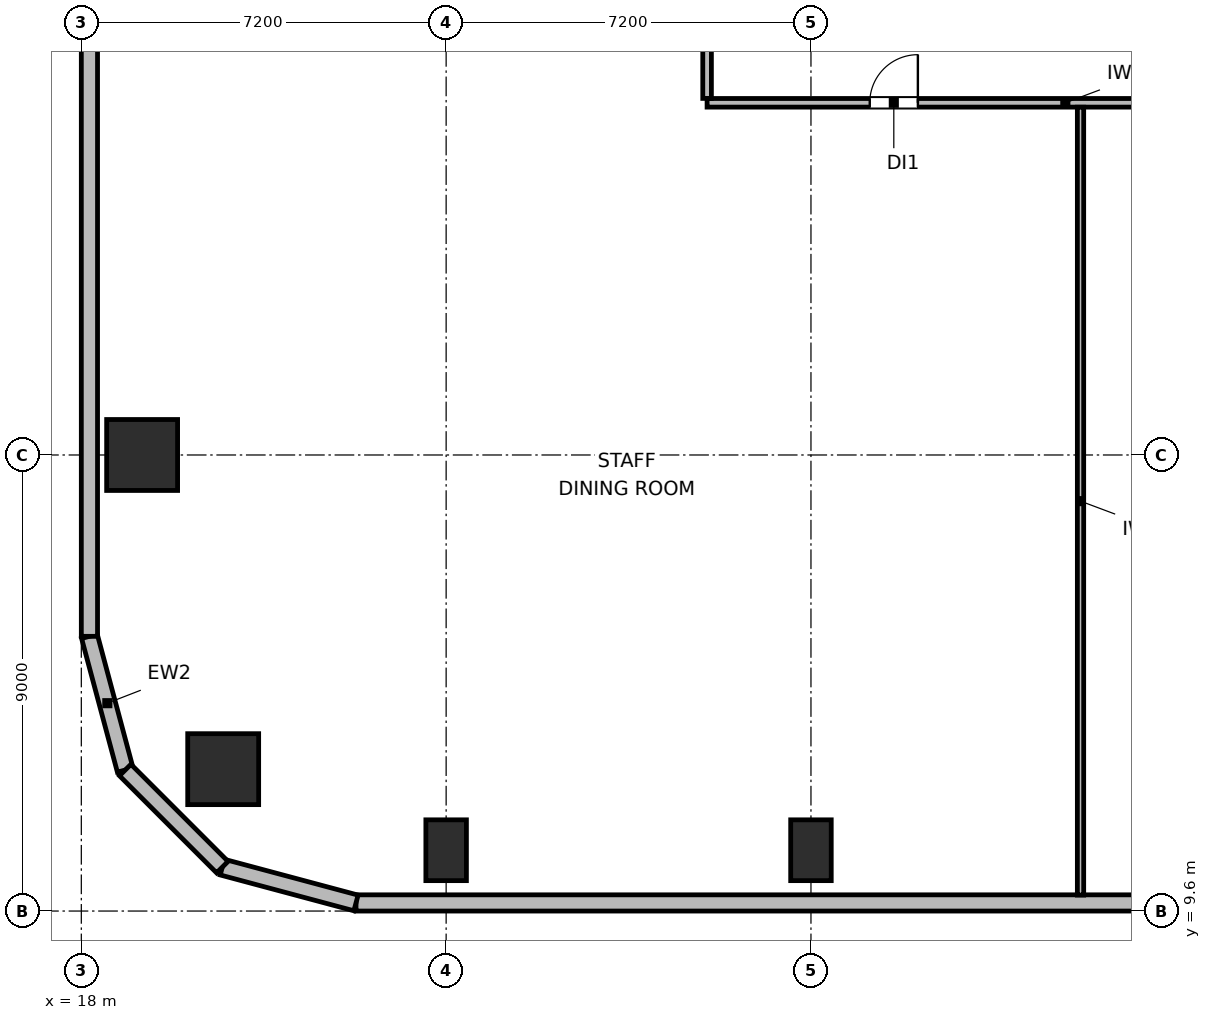
"""IFC4 building model, lengths in metres.
Left out: names, types, materials, properties, quantities, classifications, styles, units other than length and angle.
Written with IfcOpenShell. Run it as: python <this file> out.ifc"""

import sys

from ifc_helpers import new_model, si_unit, direction, frame, frame_2d, origin, origin_2d, place, context, subcontext, project, spatial, rectangle, circle, extrude, element, fill, save


model = new_model("IFC4")
c1 = context("Model", 3, precision=1e-05, world=origin(), true_north=direction((0.0, 1.0)))
c2 = subcontext(c1, "Body", "Model", "MODEL_VIEW")
j1 = project(units=[si_unit("LENGTHUNIT", "METRE"), si_unit("PLANEANGLEUNIT", "RADIAN")], contexts=[c1])
p1 = place(None, origin())
s1 = spatial("IfcSite", under=j1, at=p1, CompositionType="ELEMENT")
p2 = place(p1, origin())
s2 = spatial("IfcBuilding", under=s1, at=p2, CompositionType="ELEMENT")
p3 = place(p2, frame((0.0, 0.0, 141.6)))
s3 = spatial("IfcBuildingStorey", under=s2, at=p3, CompositionType="ELEMENT", Elevation=141.6)
p4 = place(p3, frame((20.8, 12.4, 0.0), z_axis=(0.0, 0.0, 1.0), x_axis=(1.0, 0.0, 0.0)))
e1 = element("IfcColumn", 1, at=p4, inside=s3, PredefinedType="COLUMN", context=c2, shape_type="SweptSolid", body=[
    extrude(circle(Radius=0.7, at=origin_2d()), origin(), (0.0, 0.0, 1.0), 3.9),
])
for number, where, z_axis, x_axis in (
    (2, (25.2, 10.8, 0.0), (0.0, 0.0, 1.0), (1.0, 0.0, 0.0)),
    (3, (32.4, 10.8, 0.0), (0.0, 0.0, 1.0), (1.0, 0.0, 0.0)),
):
    element("IfcColumn", number, at=place(p3, frame(where, z_axis=z_axis, x_axis=x_axis)), inside=s3, PredefinedType="COLUMN", context=c2, shape_type="SweptSolid", body=[
        extrude(rectangle(XDim=0.8, YDim=1.2, at=origin_2d()), origin(), (0.0, 0.0, 1.0), 3.9),
    ])
p5 = place(p3, frame((19.2, 18.6, 0.0), z_axis=(0.0, 0.0, 1.0), x_axis=(1.0, 0.0, 0.0)))
e4 = element("IfcColumn", 4, at=p5, inside=s3, PredefinedType="COLUMN", context=c2, shape_type="SweptSolid", body=[
    extrude(rectangle(XDim=1.4, YDim=1.4, at=origin_2d()), origin(), (0.0, 0.0, 1.0), 3.9),
])
p6 = place(p3, frame((18.866, 12.383, 0.0), z_axis=(0.0, 0.0, 1.0), x_axis=(-0.25869736047, 0.965958423373, 0.0)))
e5 = element("IfcWall", 5, at=p6, inside=s3, PredefinedType="SOLIDWALL", context=c2, shape_type="SweptSolid", body=[
    extrude(rectangle(XDim=2.731, YDim=0.32, at=frame_2d((1.366, 0.0))), origin(), (0.0, 0.0, 1.0), 3.6),
])
p7 = place(p3, frame((18.16, 15.021, 0.0), z_axis=(0.0, 0.0, 1.0), x_axis=(0.0, 1.0, 0.0)))
e6 = element("IfcWall", 6, at=p7, inside=s3, PredefinedType="SOLIDWALL", context=c2, shape_type="SweptSolid", body=[
    extrude(rectangle(XDim=14.219, YDim=0.32, at=frame_2d((7.109, 0.0))), origin(), (0.0, 0.0, 1.0), 3.6),
])
p8 = place(p3, frame((41.355, 9.76, 0.0), z_axis=(0.0, 0.0, 1.0), x_axis=(-1.0, 0.0, 0.0)))
e7 = element("IfcWall", 7, at=p8, inside=s3, PredefinedType="SOLIDWALL", context=c2, shape_type="SweptSolid", body=[
    extrude(rectangle(XDim=17.934, YDim=0.32, at=frame_2d((8.967, 0.0))), origin(), (0.0, 0.0, 1.0), 3.6),
])
p9 = place(p3, frame((23.421, 9.76, 0.0), z_axis=(0.0, 0.0, 1.0), x_axis=(-0.965964405026, 0.25867502435, 0.0)))
e8 = element("IfcWall", 8, at=p9, inside=s3, PredefinedType="SOLIDWALL", context=c2, shape_type="SweptSolid", body=[
    extrude(rectangle(XDim=2.731, YDim=0.32, at=frame_2d((1.366, 0.0))), origin(), (0.0, 0.0, 1.0), 3.6),
])
p10 = place(p3, frame((20.783, 10.467, 0.0), z_axis=(0.0, 0.0, 1.0), x_axis=(-0.707106781187, 0.707106781187, 0.0)))
e9 = element("IfcWall", 9, at=p10, inside=s3, PredefinedType="SOLIDWALL", context=c2, shape_type="SweptSolid", body=[
    extrude(rectangle(XDim=2.71, YDim=0.32, at=frame_2d((1.355, 0.0))), origin(), (0.0, 0.0, 1.0), 3.6),
])
p11 = place(p3, frame((30.35, 25.55, 0.0), z_axis=(0.0, 0.0, 1.0), x_axis=(1.0, 0.0, 0.0)))
e10 = element("IfcWall", 10, at=p11, inside=s3, PredefinedType="PARTITIONING", context=c2, shape_type="SweptSolid", body=[
    extrude(rectangle(XDim=33.25, YDim=0.17, at=frame_2d((16.625, 0.0))), origin(), (0.0, 0.0, 1.0), 3.6),
])
p12 = place(p11, frame((3.21, 0.0, 0.0)))
e11 = element("IfcOpeningElement", 11, at=p12, cuts=e10, PredefinedType="OPENING", context=c2, shape_type="SweptSolid", body=[
    extrude(rectangle(XDim=0.95, YDim=2.04, at=frame_2d((0.475, 1.02))), frame((0.0, 0.095, 0.0), z_axis=(0.0, -1.0, 0.0), x_axis=(1.0, 0.0, 0.0)), (0.0, 0.0, 1.0), 0.19),
])
p13 = place(p11, frame((9.98, 0.0, 0.0)))
e12 = element("IfcOpeningElement", 12, at=p13, cuts=e10, PredefinedType="OPENING", context=c2, shape_type="SweptSolid", body=[
    extrude(rectangle(XDim=0.95, YDim=2.04, at=frame_2d((0.475, 1.02))), frame((0.0, 0.095, 0.0), z_axis=(0.0, -1.0, 0.0), x_axis=(1.0, 0.0, 0.0)), (0.0, 0.0, 1.0), 0.19),
])
p14 = place(p11, frame((16.15, 0.0, 0.0)))
e13 = element("IfcOpeningElement", 13, at=p14, cuts=e10, PredefinedType="OPENING", context=c2, shape_type="SweptSolid", body=[
    extrude(rectangle(XDim=0.95, YDim=2.04, at=frame_2d((0.475, 1.02))), frame((0.0, 0.095, 0.0), z_axis=(0.0, -1.0, 0.0), x_axis=(1.0, 0.0, 0.0)), (0.0, 0.0, 1.0), 0.19),
])
p15 = place(p11, frame((22.32, 0.0, 0.0)))
e14 = element("IfcOpeningElement", 14, at=p15, cuts=e10, PredefinedType="OPENING", context=c2, shape_type="SweptSolid", body=[
    extrude(rectangle(XDim=0.95, YDim=2.04, at=frame_2d((0.475, 1.02))), frame((0.0, 0.095, 0.0), z_axis=(0.0, -1.0, 0.0), x_axis=(1.0, 0.0, 0.0)), (0.0, 0.0, 1.0), 0.19),
])
p16 = place(p11, frame((29.09, 0.0, 0.0)))
e15 = element("IfcOpeningElement", 15, at=p16, cuts=e10, PredefinedType="OPENING", context=c2, shape_type="SweptSolid", body=[
    extrude(rectangle(XDim=0.95, YDim=2.04, at=frame_2d((0.475, 1.02))), frame((0.0, 0.095, 0.0), z_axis=(0.0, -1.0, 0.0), x_axis=(1.0, 0.0, 0.0)), (0.0, 0.0, 1.0), 0.19),
])
p17 = place(p3, frame((30.35, 25.637, 0.0), z_axis=(0.0, 0.0, 1.0), x_axis=(0.0, 1.0, 0.0)))
e16 = element("IfcWall", 16, at=p17, inside=s3, PredefinedType="PARTITIONING", context=c2, shape_type="SweptSolid", body=[
    extrude(rectangle(XDim=8.763, YDim=0.17, at=frame_2d((4.381, 0.0))), origin(), (0.0, 0.0, 1.0), 3.6),
])
p18 = place(p17, frame((3.863, 0.0, 0.0)))
e17 = element("IfcOpeningElement", 17, at=p18, cuts=e16, PredefinedType="OPENING", context=c2, shape_type="SweptSolid", body=[
    extrude(rectangle(XDim=0.95, YDim=2.04, at=frame_2d((0.475, 1.02))), frame((0.0, 0.095, 0.0), z_axis=(0.0, -1.0, 0.0), x_axis=(1.0, 0.0, 0.0)), (0.0, 0.0, 1.0), 0.19),
])
p19 = place(p3, frame((37.72, 9.915, 0.0), z_axis=(0.0, 0.0, 1.0), x_axis=(0.0, 1.0, 0.0)))
e18 = element("IfcWall", 18, at=p19, inside=s3, PredefinedType="PARTITIONING", context=c2, shape_type="SweptSolid", body=[
    extrude(rectangle(XDim=15.548, YDim=0.125, at=frame_2d((7.774, 0.0))), origin(), (0.0, 0.0, 1.0), 3.6),
])
p20 = place(p12, origin())
e19 = element("IfcDoor", 19, at=p20, inside=s3, OperationType="SINGLE_SWING_RIGHT", PredefinedType="DOOR", context=c2, shape_type="SweptSolid", body=[
    extrude(rectangle(XDim=0.95, YDim=2.04, at=frame_2d((0.475, 1.02))), frame((0.0, 0.025, 0.0), z_axis=(0.0, -1.0, 0.0), x_axis=(1.0, 0.0, 0.0)), (0.0, 0.0, 1.0), 0.05),
])
fill(e11, e19)
save(model, sys.argv[1])
